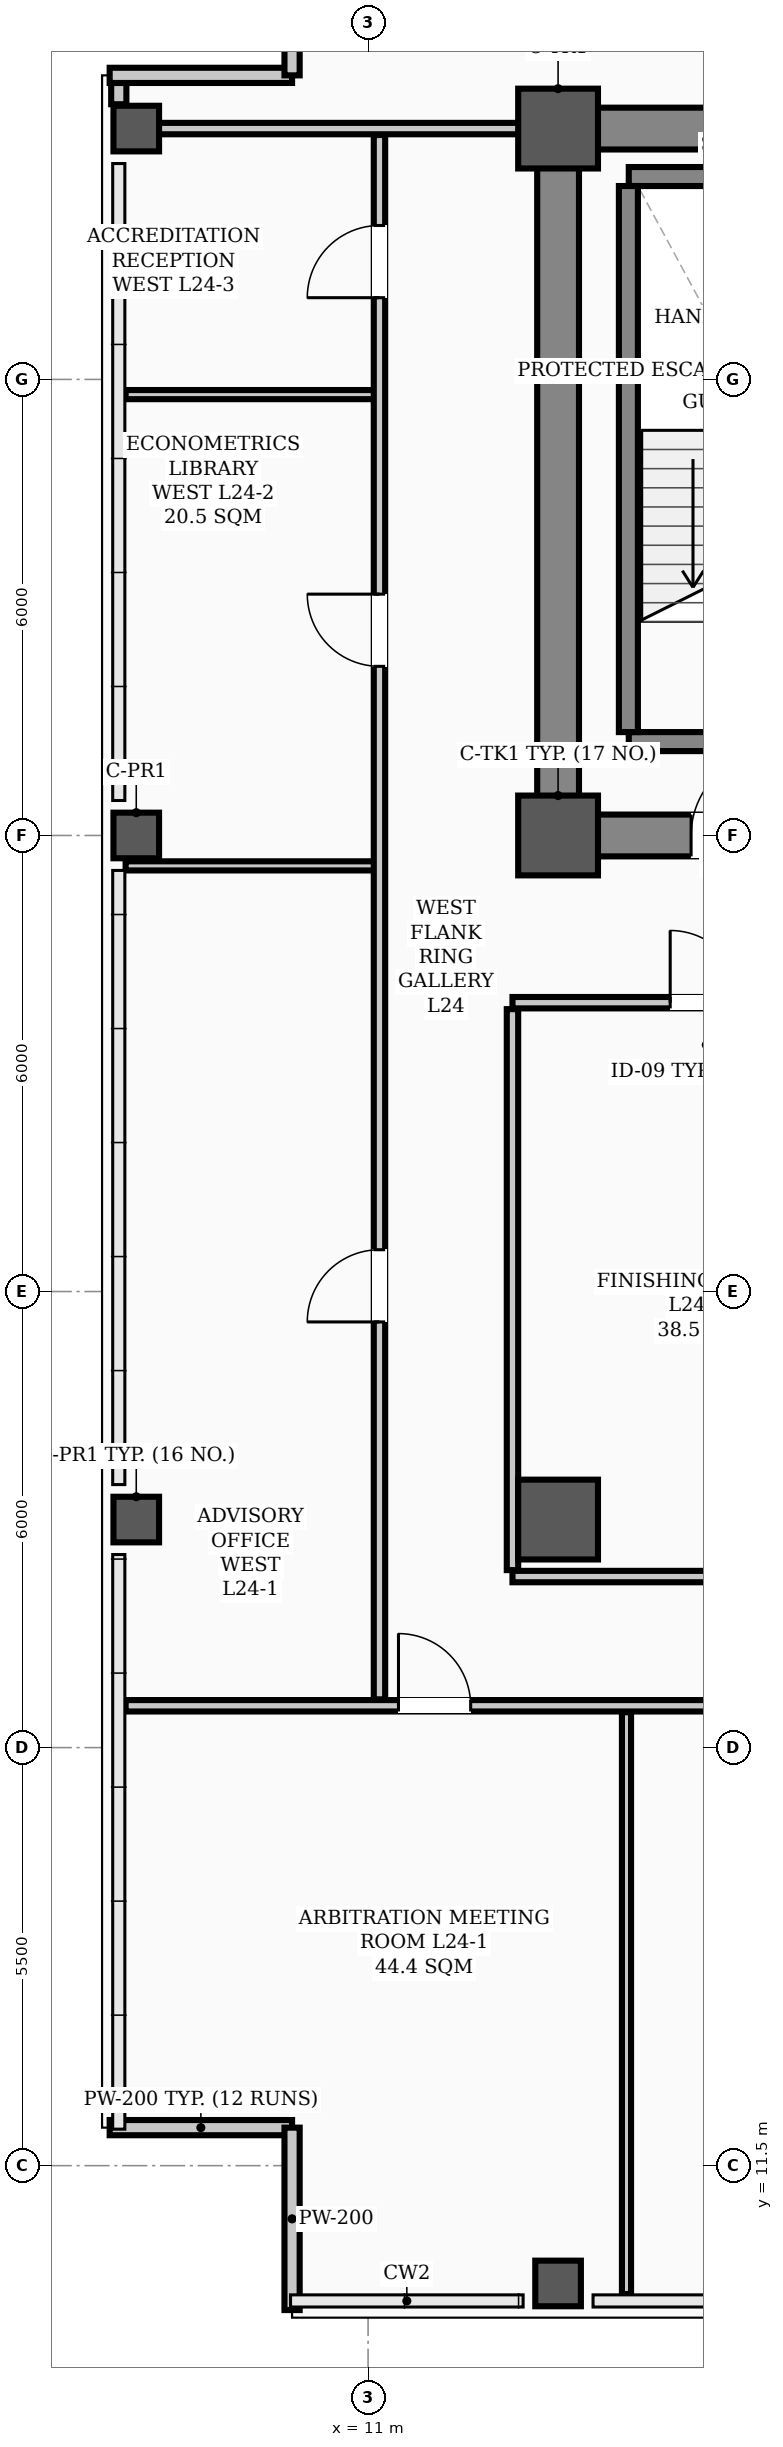
"""IFC4 building model, lengths in metres.
Left out: names, types, materials, properties, quantities, classifications, styles, units other than length and angle.
Written with IfcOpenShell. Run it as: python <this file> out.ifc"""

import sys

from ifc_helpers import new_model, si_unit, direction, frame, frame_2d, origin, origin_2d, place, context, subcontext, project, spatial, rectangle, hollow_rectangle, extrude, element, fill, save


model = new_model("IFC4")
c1 = context("Model", 3, precision=1e-05, world=origin(), true_north=direction((0.0, 1.0)))
c2 = subcontext(c1, "Body", "Model", "MODEL_VIEW")
j1 = project(units=[si_unit("LENGTHUNIT", "METRE"), si_unit("PLANEANGLEUNIT", "RADIAN")], contexts=[c1])
p1 = place(None, origin())
s1 = spatial("IfcSite", under=j1, at=p1, CompositionType="ELEMENT")
p2 = place(p1, origin())
s2 = spatial("IfcBuilding", under=s1, at=p2, CompositionType="ELEMENT")
p3 = place(p2, frame((0.0, 0.0, 96.7)))
s3 = spatial("IfcBuildingStorey", under=s2, at=p3, CompositionType="ELEMENT", Elevation=96.7)
for number, where, z_axis, x_axis in (
    (1, (13.5, 29.0, 0.0), (0.0, 0.0, 1.0), (1.0, 0.0, 0.0)),
    (2, (13.5, 38.3, 0.0), (0.0, 0.0, 1.0), (1.0, 0.0, 0.0)),
    (3, (13.5, 20.0, 0.0), (0.0, 0.0, 1.0), (1.0, 0.0, 0.0)),
):
    element("IfcColumn", number, at=place(p3, frame(where, z_axis=z_axis, x_axis=x_axis)), inside=s3, PredefinedType="COLUMN", context=c2, shape_type="SweptSolid", body=[
        extrude(hollow_rectangle(XDim=1.05, YDim=1.05, WallThickness=0.038, InnerFilletRadius=0.019, OuterFilletRadius=0.057, at=origin_2d()), origin(), (0.0, 0.0, 1.0), 3.9),
    ])
for number, where, z_axis, x_axis in (
    (4, (7.95, 20.0, 0.0), (0.0, 0.0, 1.0), (1.0, 0.0, 0.0)),
    (5, (7.95, 29.0, 0.0), (0.0, 0.0, 1.0), (1.0, 0.0, 0.0)),
    (6, (7.95, 38.3, 0.0), (0.0, 0.0, 1.0), (1.0, 0.0, 0.0)),
    (7, (13.5, 9.95, 0.0), (0.0, 0.0, 1.0), (1.0, 0.0, 0.0)),
):
    element("IfcColumn", number, at=place(p3, frame(where, z_axis=z_axis, x_axis=x_axis)), inside=s3, PredefinedType="COLUMN", context=c2, shape_type="SweptSolid", body=[
        extrude(hollow_rectangle(XDim=0.6, YDim=0.6, WallThickness=0.026, InnerFilletRadius=0.013, OuterFilletRadius=0.039, at=origin_2d()), origin(), (0.0, 0.0, 1.0), 3.9),
    ])
p4 = place(p3, frame((7.72, 38.62, 0.0), z_axis=(0.0, 0.0, 1.0), x_axis=(0.0, 1.0, 0.0)))
e8 = element("IfcWall", 8, at=p4, inside=s3, PredefinedType="PARAPET", context=c2, shape_type="SweptSolid", body=[
    extrude(rectangle(XDim=0.28, YDim=0.2, at=frame_2d((0.14, 0.0))), origin(), (0.0, 0.0, 1.0), 1.2),
])
for number, where, z_axis, x_axis in (
    (9, (7.6, 12.0, 0.0), (0.0, 0.0, 1.0), (1.0, 0.0, 0.0)),
    (10, (10.0, 12.0, 0.0), (0.0, 0.0, 1.0), (0.0, -1.0, 0.0)),
    (11, (7.6, 39.0, 0.0), (0.0, 0.0, 1.0), (1.0, 0.0, 0.0)),
    (12, (10.0, 39.0, 0.0), (0.0, 0.0, 1.0), (0.0, 1.0, 0.0)),
):
    element("IfcWall", number, at=place(p3, frame(where, z_axis=z_axis, x_axis=x_axis)), inside=s3, PredefinedType="PARAPET", context=c2, shape_type="SweptSolid", body=[
        extrude(rectangle(XDim=2.4, YDim=0.2, at=frame_2d((1.2, 0.0))), origin(), (0.0, 0.0, 1.0), 1.2),
    ])
p5 = place(p3, frame((13.5, 29.0, 0.0), z_axis=(0.0, 0.0, 1.0), x_axis=(1.0, 0.0, 0.0)))
e13 = element("IfcWall", 13, at=p5, inside=s3, PredefinedType="SHEAR", context=c2, shape_type="SweptSolid", body=[
    extrude(rectangle(XDim=30.5, YDim=0.55, at=frame_2d((15.25, 0.0))), origin(), (0.0, 0.0, 1.0), 3.6),
])
p6 = place(p5, frame((1.75, 0.0, 0.0)))
e14 = element("IfcOpeningElement", 14, at=p6, cuts=e13, PredefinedType="OPENING", context=c2, shape_type="SweptSolid", body=[
    extrude(rectangle(XDim=1.1, YDim=2.08, at=frame_2d((0.55, 1.04))), frame((0.0, 0.285, 0.0), z_axis=(0.0, -1.0, 0.0), x_axis=(1.0, 0.0, 0.0)), (0.0, 0.0, 1.0), 0.57),
])
p7 = place(p5, frame((26.7, 0.0, 0.0)))
e15 = element("IfcOpeningElement", 15, at=p7, cuts=e13, PredefinedType="OPENING", context=c2, shape_type="SweptSolid", body=[
    extrude(rectangle(XDim=1.1, YDim=2.08, at=frame_2d((0.55, 1.04))), frame((0.0, 0.285, 0.0), z_axis=(0.0, -1.0, 0.0), x_axis=(1.0, 0.0, 0.0)), (0.0, 0.0, 1.0), 0.57),
])
p8 = place(p5, frame((6.8, 0.0, 0.0)))
e16 = element("IfcOpeningElement", 16, at=p8, cuts=e13, PredefinedType="OPENING", context=c2, shape_type="SweptSolid", body=[
    extrude(rectangle(XDim=1.1, YDim=2.08, at=frame_2d((0.55, 1.04))), frame((0.0, 0.285, 0.0), z_axis=(0.0, -1.0, 0.0), x_axis=(1.0, 0.0, 0.0)), (0.0, 0.0, 1.0), 0.57),
])
p9 = place(p5, frame((13.2, 0.0, 0.0)))
e17 = element("IfcOpeningElement", 17, at=p9, cuts=e13, PredefinedType="OPENING", context=c2, shape_type="SweptSolid", body=[
    extrude(rectangle(XDim=1.6, YDim=2.08, at=frame_2d((0.8, 1.04))), frame((0.0, 0.285, 0.0), z_axis=(0.0, -1.0, 0.0), x_axis=(1.0, 0.0, 0.0)), (0.0, 0.0, 1.0), 0.57),
])
p10 = place(p5, frame((19.53, 0.0, 0.0)))
e18 = element("IfcOpeningElement", 18, at=p10, cuts=e13, PredefinedType="OPENING", context=c2, shape_type="SweptSolid", body=[
    extrude(rectangle(XDim=0.9, YDim=2.08, at=frame_2d((0.45, 1.04))), frame((0.0, 0.285, 0.0), z_axis=(0.0, -1.0, 0.0), x_axis=(1.0, 0.0, 0.0)), (0.0, 0.0, 1.0), 0.57),
])
p11 = place(p5, frame((21.57, 0.0, 0.0)))
e19 = element("IfcOpeningElement", 19, at=p11, cuts=e13, PredefinedType="OPENING", context=c2, shape_type="SweptSolid", body=[
    extrude(rectangle(XDim=0.9, YDim=2.08, at=frame_2d((0.45, 1.04))), frame((0.0, 0.285, 0.0), z_axis=(0.0, -1.0, 0.0), x_axis=(1.0, 0.0, 0.0)), (0.0, 0.0, 1.0), 0.57),
])
p12 = place(p3, frame((13.5, 38.3, 0.0), z_axis=(0.0, 0.0, 1.0), x_axis=(1.0, 0.0, 0.0)))
e20 = element("IfcWall", 20, at=p12, inside=s3, PredefinedType="SHEAR", context=c2, shape_type="SweptSolid", body=[
    extrude(rectangle(XDim=30.5, YDim=0.55, at=frame_2d((15.25, 0.0))), origin(), (0.0, 0.0, 1.0), 3.6),
])
p13 = place(p3, frame((13.5, 29.35, 0.0), z_axis=(0.0, 0.0, 1.0), x_axis=(0.0, 1.0, 0.0)))
e21 = element("IfcWall", 21, at=p13, inside=s3, PredefinedType="SHEAR", context=c2, shape_type="SweptSolid", body=[
    extrude(rectangle(XDim=8.6, YDim=0.55, at=frame_2d((4.3, 0.0))), origin(), (0.0, 0.0, 1.0), 3.6),
])
p14 = place(p3, frame((14.43, 30.235, 0.0), z_axis=(0.0, 0.0, 1.0), x_axis=(1.0, 0.0, 0.0)))
e22 = element("IfcWall", 22, at=p14, inside=s3, PredefinedType="STANDARD", context=c2, shape_type="SweptSolid", body=[
    extrude(rectangle(XDim=3.34, YDim=0.25, at=frame_2d((1.67, 0.0))), origin(), (0.0, 0.0, 1.0), 3.6),
])
p15 = place(p14, frame((1.1, 0.0, 0.0)))
e23 = element("IfcOpeningElement", 23, at=p15, cuts=e22, PredefinedType="OPENING", context=c2, shape_type="SweptSolid", body=[
    extrude(rectangle(XDim=1.1, YDim=2.08, at=frame_2d((0.55, 1.04))), frame((0.0, 0.135, 0.0), z_axis=(0.0, -1.0, 0.0), x_axis=(1.0, 0.0, 0.0)), (0.0, 0.0, 1.0), 0.27),
])
p16 = place(p3, frame((14.43, 37.669, 0.0), z_axis=(0.0, 0.0, 1.0), x_axis=(1.0, 0.0, 0.0)))
e24 = element("IfcWall", 24, at=p16, inside=s3, PredefinedType="STANDARD", context=c2, shape_type="SweptSolid", body=[
    extrude(rectangle(XDim=3.34, YDim=0.25, at=frame_2d((1.67, 0.0))), origin(), (0.0, 0.0, 1.0), 3.6),
])
p17 = place(p3, frame((14.425, 30.36, 0.0), z_axis=(0.0, 0.0, 1.0), x_axis=(0.0, 1.0, 0.0)))
e25 = element("IfcWall", 25, at=p17, inside=s3, PredefinedType="STANDARD", context=c2, shape_type="SweptSolid", body=[
    extrude(rectangle(XDim=7.184, YDim=0.25, at=frame_2d((3.592, 0.0))), origin(), (0.0, 0.0, 1.0), 3.6),
])
p18 = place(p3, frame((12.9, 26.8, 0.0), z_axis=(0.0, 0.0, 1.0), x_axis=(1.0, 0.0, 0.0)))
e26 = element("IfcWall", 26, at=p18, inside=s3, PredefinedType="PARTITIONING", context=c2, shape_type="SweptSolid", body=[
    extrude(rectangle(XDim=31.7, YDim=0.15, at=frame_2d((15.85, 0.0))), origin(), (0.0, 0.0, 1.0), 2.18),
])
p19 = place(p18, frame((13.6, 0.0, 0.0)))
e27 = element("IfcOpeningElement", 27, at=p19, cuts=e26, PredefinedType="OPENING", context=c2, shape_type="SweptSolid", body=[
    extrude(rectangle(XDim=1.6, YDim=2.08, at=frame_2d((0.8, 1.04))), frame((0.0, 0.085, 0.0), z_axis=(0.0, -1.0, 0.0), x_axis=(1.0, 0.0, 0.0)), (0.0, 0.0, 1.0), 0.17),
])
p20 = place(p18, frame((2.075, 0.0, 0.0)))
e28 = element("IfcOpeningElement", 28, at=p20, cuts=e26, PredefinedType="OPENING", context=c2, shape_type="SweptSolid", body=[
    extrude(rectangle(XDim=0.95, YDim=2.08, at=frame_2d((0.475, 1.04))), frame((0.0, 0.085, 0.0), z_axis=(0.0, -1.0, 0.0), x_axis=(1.0, 0.0, 0.0)), (0.0, 0.0, 1.0), 0.17),
])
p21 = place(p18, frame((6.925, 0.0, 0.0)))
e29 = element("IfcOpeningElement", 29, at=p21, cuts=e26, PredefinedType="OPENING", context=c2, shape_type="SweptSolid", body=[
    extrude(rectangle(XDim=0.95, YDim=2.08, at=frame_2d((0.475, 1.04))), frame((0.0, 0.085, 0.0), z_axis=(0.0, -1.0, 0.0), x_axis=(1.0, 0.0, 0.0)), (0.0, 0.0, 1.0), 0.17),
])
p22 = place(p18, frame((11.025, 0.0, 0.0)))
e30 = element("IfcOpeningElement", 30, at=p22, cuts=e26, PredefinedType="OPENING", context=c2, shape_type="SweptSolid", body=[
    extrude(rectangle(XDim=0.95, YDim=2.08, at=frame_2d((0.475, 1.04))), frame((0.0, 0.085, 0.0), z_axis=(0.0, -1.0, 0.0), x_axis=(1.0, 0.0, 0.0)), (0.0, 0.0, 1.0), 0.17),
])
p23 = place(p18, frame((16.075, 0.0, 0.0)))
e31 = element("IfcOpeningElement", 31, at=p23, cuts=e26, PredefinedType="OPENING", context=c2, shape_type="SweptSolid", body=[
    extrude(rectangle(XDim=0.95, YDim=2.08, at=frame_2d((0.475, 1.04))), frame((0.0, 0.085, 0.0), z_axis=(0.0, -1.0, 0.0), x_axis=(1.0, 0.0, 0.0)), (0.0, 0.0, 1.0), 0.17),
])
p24 = place(p18, frame((22.025, 0.0, 0.0)))
e32 = element("IfcOpeningElement", 32, at=p24, cuts=e26, PredefinedType="OPENING", context=c2, shape_type="SweptSolid", body=[
    extrude(rectangle(XDim=0.95, YDim=2.08, at=frame_2d((0.475, 1.04))), frame((0.0, 0.085, 0.0), z_axis=(0.0, -1.0, 0.0), x_axis=(1.0, 0.0, 0.0)), (0.0, 0.0, 1.0), 0.17),
])
p25 = place(p18, frame((28.525, 0.0, 0.0)))
e33 = element("IfcOpeningElement", 33, at=p25, cuts=e26, PredefinedType="OPENING", context=c2, shape_type="SweptSolid", body=[
    extrude(rectangle(XDim=0.95, YDim=2.08, at=frame_2d((0.475, 1.04))), frame((0.0, 0.085, 0.0), z_axis=(0.0, -1.0, 0.0), x_axis=(1.0, 0.0, 0.0)), (0.0, 0.0, 1.0), 0.17),
])
p26 = place(p3, frame((7.81, 17.55, 0.0), z_axis=(0.0, 0.0, 1.0), x_axis=(1.0, 0.0, 0.0)))
e34 = element("IfcWall", 34, at=p26, inside=s3, PredefinedType="PARTITIONING", context=c2, shape_type="SweptSolid", body=[
    extrude(rectangle(XDim=49.38, YDim=0.15, at=frame_2d((24.69, 0.0))), origin(), (0.0, 0.0, 1.0), 2.18),
])
p27 = place(p26, frame((3.59, 0.0, 0.0)))
e35 = element("IfcOpeningElement", 35, at=p27, cuts=e34, PredefinedType="OPENING", context=c2, shape_type="SweptSolid", body=[
    extrude(rectangle(XDim=0.95, YDim=2.08, at=frame_2d((0.475, 1.04))), frame((0.0, 0.085, 0.0), z_axis=(0.0, -1.0, 0.0), x_axis=(1.0, 0.0, 0.0)), (0.0, 0.0, 1.0), 0.17),
])
p28 = place(p26, frame((10.115, 0.0, 0.0)))
e36 = element("IfcOpeningElement", 36, at=p28, cuts=e34, PredefinedType="OPENING", context=c2, shape_type="SweptSolid", body=[
    extrude(rectangle(XDim=0.95, YDim=2.08, at=frame_2d((0.475, 1.04))), frame((0.0, 0.085, 0.0), z_axis=(0.0, -1.0, 0.0), x_axis=(1.0, 0.0, 0.0)), (0.0, 0.0, 1.0), 0.17),
])
p29 = place(p26, frame((18.615, 0.0, 0.0)))
e37 = element("IfcOpeningElement", 37, at=p29, cuts=e34, PredefinedType="OPENING", context=c2, shape_type="SweptSolid", body=[
    extrude(rectangle(XDim=0.95, YDim=2.08, at=frame_2d((0.475, 1.04))), frame((0.0, 0.085, 0.0), z_axis=(0.0, -1.0, 0.0), x_axis=(1.0, 0.0, 0.0)), (0.0, 0.0, 1.0), 0.17),
])
p30 = place(p26, frame((27.315, 0.0, 0.0)))
e38 = element("IfcOpeningElement", 38, at=p30, cuts=e34, PredefinedType="OPENING", context=c2, shape_type="SweptSolid", body=[
    extrude(rectangle(XDim=0.95, YDim=2.08, at=frame_2d((0.475, 1.04))), frame((0.0, 0.085, 0.0), z_axis=(0.0, -1.0, 0.0), x_axis=(1.0, 0.0, 0.0)), (0.0, 0.0, 1.0), 0.17),
])
p31 = place(p26, frame((33.89, 0.0, 0.0)))
e39 = element("IfcOpeningElement", 39, at=p31, cuts=e34, PredefinedType="OPENING", context=c2, shape_type="SweptSolid", body=[
    extrude(rectangle(XDim=0.95, YDim=2.08, at=frame_2d((0.475, 1.04))), frame((0.0, 0.085, 0.0), z_axis=(0.0, -1.0, 0.0), x_axis=(1.0, 0.0, 0.0)), (0.0, 0.0, 1.0), 0.17),
])
p32 = place(p3, frame((12.9, 19.25, 0.0), z_axis=(0.0, 0.0, 1.0), x_axis=(1.0, 0.0, 0.0)))
e40 = element("IfcWall", 40, at=p32, inside=s3, PredefinedType="PARTITIONING", context=c2, shape_type="SweptSolid", body=[
    extrude(rectangle(XDim=13.3, YDim=0.15, at=frame_2d((6.65, 0.0))), origin(), (0.0, 0.0, 1.0), 2.18),
])
p33 = place(p3, frame((7.81, 38.3, 0.0), z_axis=(0.0, 0.0, 1.0), x_axis=(1.0, 0.0, 0.0)))
e41 = element("IfcWall", 41, at=p33, inside=s3, PredefinedType="PARTITIONING", context=c2, shape_type="SweptSolid", body=[
    extrude(rectangle(XDim=5.69, YDim=0.15, at=frame_2d((2.845, 0.0))), origin(), (0.0, 0.0, 1.0), 2.18),
])
for number, where, z_axis, x_axis in (
    (42, (7.81, 28.6, 0.0), (0.0, 0.0, 1.0), (1.0, 0.0, 0.0)),
    (43, (7.81, 34.8, 0.0), (0.0, 0.0, 1.0), (1.0, 0.0, 0.0)),
):
    element("IfcWall", number, at=place(p3, frame(where, z_axis=z_axis, x_axis=x_axis)), inside=s3, PredefinedType="PARTITIONING", context=c2, shape_type="SweptSolid", body=[
        extrude(rectangle(XDim=3.34, YDim=0.12, at=frame_2d((1.67, 0.0))), origin(), (0.0, 0.0, 1.0), 2.18),
    ])
p34 = place(p3, frame((11.15, 17.635, 0.0), z_axis=(0.0, 0.0, 1.0), x_axis=(0.0, 1.0, 0.0)))
e44 = element("IfcWall", 44, at=p34, inside=s3, PredefinedType="PARTITIONING", context=c2, shape_type="SweptSolid", body=[
    extrude(rectangle(XDim=20.58, YDim=0.15, at=frame_2d((10.29, 0.0))), origin(), (0.0, 0.0, 1.0), 2.18),
])
p35 = place(p34, frame((4.965, 0.0, 0.0)))
e45 = element("IfcOpeningElement", 45, at=p35, cuts=e44, PredefinedType="OPENING", context=c2, shape_type="SweptSolid", body=[
    extrude(rectangle(XDim=0.95, YDim=2.08, at=frame_2d((0.475, 1.04))), frame((0.0, 0.085, 0.0), z_axis=(0.0, -1.0, 0.0), x_axis=(1.0, 0.0, 0.0)), (0.0, 0.0, 1.0), 0.17),
])
p36 = place(p34, frame((13.59, 0.0, 0.0)))
e46 = element("IfcOpeningElement", 46, at=p36, cuts=e44, PredefinedType="OPENING", context=c2, shape_type="SweptSolid", body=[
    extrude(rectangle(XDim=0.95, YDim=2.08, at=frame_2d((0.475, 1.04))), frame((0.0, 0.085, 0.0), z_axis=(0.0, -1.0, 0.0), x_axis=(1.0, 0.0, 0.0)), (0.0, 0.0, 1.0), 0.17),
])
p37 = place(p34, frame((18.44, 0.0, 0.0)))
e47 = element("IfcOpeningElement", 47, at=p37, cuts=e44, PredefinedType="OPENING", context=c2, shape_type="SweptSolid", body=[
    extrude(rectangle(XDim=0.95, YDim=2.08, at=frame_2d((0.475, 1.04))), frame((0.0, 0.085, 0.0), z_axis=(0.0, -1.0, 0.0), x_axis=(1.0, 0.0, 0.0)), (0.0, 0.0, 1.0), 0.17),
])
p38 = place(p3, frame((12.9, 19.335, 0.0), z_axis=(0.0, 0.0, 1.0), x_axis=(0.0, 1.0, 0.0)))
e48 = element("IfcWall", 48, at=p38, inside=s3, PredefinedType="PARTITIONING", context=c2, shape_type="SweptSolid", body=[
    extrude(rectangle(XDim=7.38, YDim=0.15, at=frame_2d((3.69, 0.0))), origin(), (0.0, 0.0, 1.0), 2.18),
])
p39 = place(p3, frame((14.4, 9.81, 0.0), z_axis=(0.0, 0.0, 1.0), x_axis=(0.0, 1.0, 0.0)))
e49 = element("IfcWall", 49, at=p39, inside=s3, PredefinedType="PARTITIONING", context=c2, shape_type="SweptSolid", body=[
    extrude(rectangle(XDim=7.655, YDim=0.12, at=frame_2d((3.828, 0.0))), origin(), (0.0, 0.0, 1.0), 2.18),
])
p40 = place(p6, origin())
e50 = element("IfcDoor", 50, at=p40, inside=s3, OperationType="SINGLE_SWING_RIGHT", PredefinedType="DOOR", context=c2, shape_type="SweptSolid", body=[
    extrude(rectangle(XDim=1.1, YDim=2.08, at=frame_2d((0.55, 1.04))), frame((0.0, 0.025, 0.0), z_axis=(0.0, -1.0, 0.0), x_axis=(1.0, 0.0, 0.0)), (0.0, 0.0, 1.0), 0.05),
])
fill(e14, e50)
p41 = place(p27, origin())
e51 = element("IfcDoor", 51, at=p41, inside=s3, OperationType="SINGLE_SWING_LEFT", PredefinedType="DOOR", context=c2, shape_type="SweptSolid", body=[
    extrude(rectangle(XDim=0.95, YDim=2.08, at=frame_2d((0.475, 1.04))), frame((0.0, 0.025, 0.0), z_axis=(0.0, -1.0, 0.0), x_axis=(1.0, 0.0, 0.0)), (0.0, 0.0, 1.0), 0.05),
])
fill(e35, e51)
p42 = place(p20, origin())
e52 = element("IfcDoor", 52, at=p42, inside=s3, OperationType="SINGLE_SWING_LEFT", PredefinedType="DOOR", context=c2, shape_type="SweptSolid", body=[
    extrude(rectangle(XDim=0.95, YDim=2.08, at=frame_2d((0.475, 1.04))), frame((0.0, 0.025, 0.0), z_axis=(0.0, -1.0, 0.0), x_axis=(1.0, 0.0, 0.0)), (0.0, 0.0, 1.0), 0.05),
])
fill(e28, e52)
p43 = place(p35, origin())
e53 = element("IfcDoor", 53, at=p43, inside=s3, OperationType="SINGLE_SWING_LEFT", PredefinedType="DOOR", context=c2, shape_type="SweptSolid", body=[
    extrude(rectangle(XDim=0.95, YDim=2.08, at=frame_2d((0.475, 1.04))), frame((0.0, 0.025, 0.0), z_axis=(0.0, -1.0, 0.0), x_axis=(1.0, 0.0, 0.0)), (0.0, 0.0, 1.0), 0.05),
])
fill(e45, e53)
p44 = place(p36, origin())
e54 = element("IfcDoor", 54, at=p44, inside=s3, OperationType="SINGLE_SWING_RIGHT", PredefinedType="DOOR", context=c2, shape_type="SweptSolid", body=[
    extrude(rectangle(XDim=0.95, YDim=2.08, at=frame_2d((0.475, 1.04))), frame((0.0, 0.025, 0.0), z_axis=(0.0, -1.0, 0.0), x_axis=(1.0, 0.0, 0.0)), (0.0, 0.0, 1.0), 0.05),
])
fill(e46, e54)
p45 = place(p37, origin())
e55 = element("IfcDoor", 55, at=p45, inside=s3, OperationType="SINGLE_SWING_LEFT", PredefinedType="DOOR", context=c2, shape_type="SweptSolid", body=[
    extrude(rectangle(XDim=0.95, YDim=2.08, at=frame_2d((0.475, 1.04))), frame((0.0, 0.025, 0.0), z_axis=(0.0, -1.0, 0.0), x_axis=(1.0, 0.0, 0.0)), (0.0, 0.0, 1.0), 0.05),
])
fill(e47, e55)
save(model, sys.argv[1])
